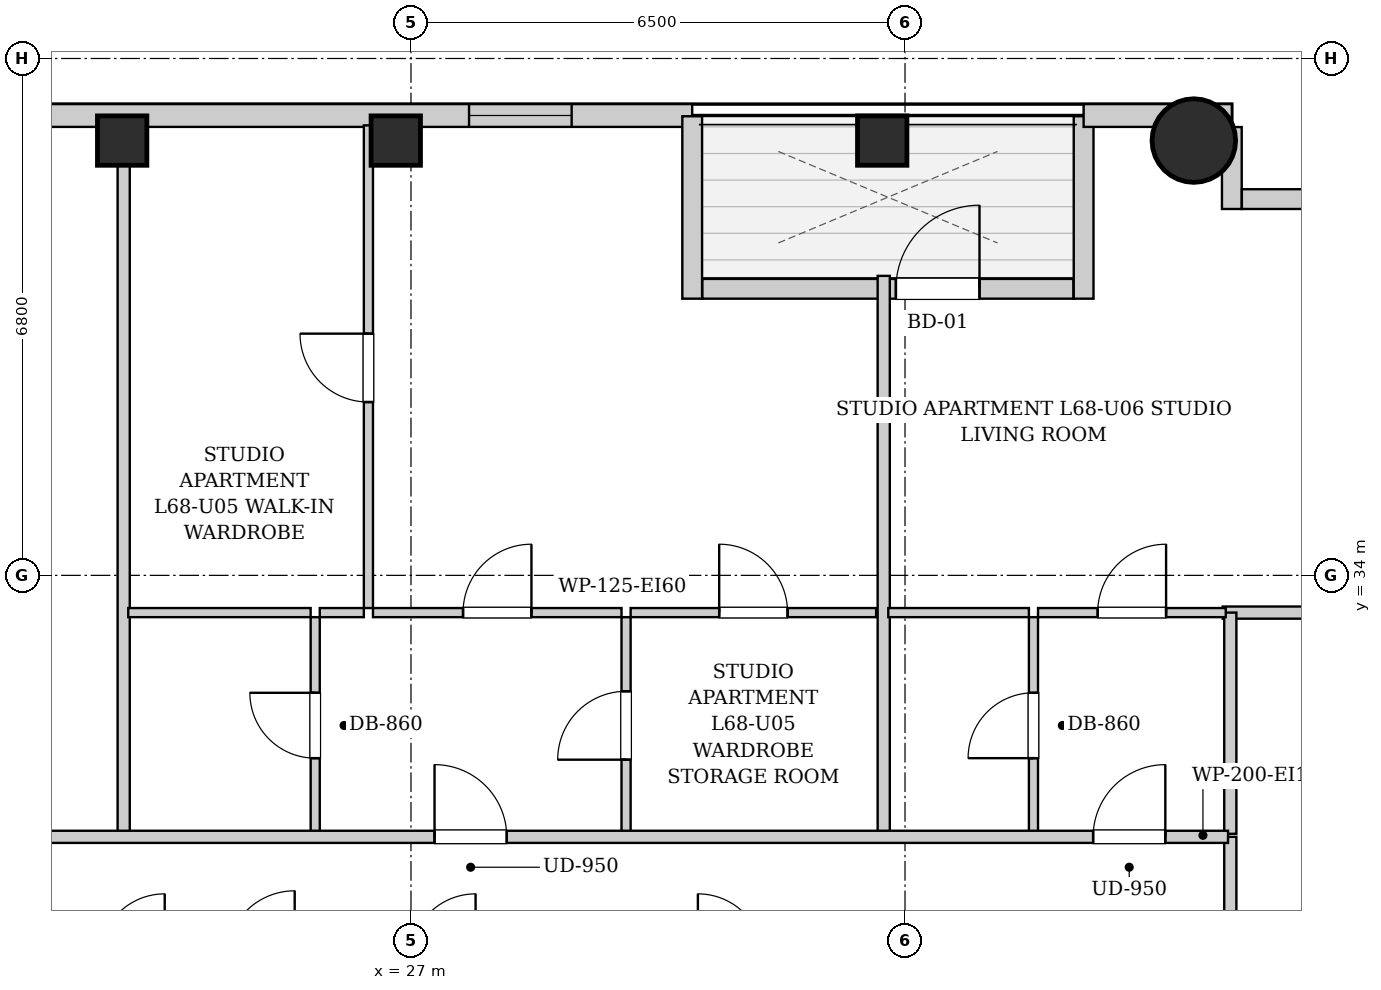
"""IFC4 building model, lengths in metres.
Left out: names, types, materials, properties, quantities, classifications, styles, units other than length and angle.
Written with IfcOpenShell. Run it as: python <this file> out.ifc"""

import sys

from ifc_helpers import new_model, si_unit, direction, frame, frame_2d, origin, origin_2d, place, context, subcontext, project, spatial, rectangle, circle, extrude, element, fill, save


model = new_model("IFC4")
c1 = context("Model", 3, precision=1e-05, world=origin(), true_north=direction((0.0, 1.0)))
c2 = subcontext(c1, "Body", "Model", "MODEL_VIEW")
j1 = project(units=[si_unit("LENGTHUNIT", "METRE"), si_unit("PLANEANGLEUNIT", "RADIAN")], contexts=[c1])
p1 = place(None, origin())
s1 = spatial("IfcSite", under=j1, at=p1, CompositionType="ELEMENT")
p2 = place(p1, origin())
s2 = spatial("IfcBuilding", under=s1, at=p2, CompositionType="ELEMENT")
p3 = place(p2, frame((0.0, 0.0, 234.3)))
s3 = spatial("IfcBuildingStorey", under=s2, at=p3, CompositionType="ELEMENT", Elevation=234.3)
for number, where, z_axis, x_axis in (
    (1, (23.2, 39.72, 0.0), (0.0, 0.0, 1.0), (1.0, 0.0, 0.0)),
    (2, (26.8, 39.72, 0.0), (0.0, 0.0, 1.0), (1.0, 0.0, 0.0)),
    (3, (33.2, 39.72, 0.0), (0.0, 0.0, 1.0), (1.0, 0.0, 0.0)),
):
    element("IfcColumn", number, at=place(p3, frame(where, z_axis=z_axis, x_axis=x_axis)), inside=s3, PredefinedType="COLUMN", context=c2, shape_type="SweptSolid", body=[
        extrude(rectangle(XDim=0.65, YDim=0.65, at=origin_2d()), origin(), (0.0, 0.0, 1.0), 3.4),
    ])
p4 = place(p3, frame((37.3, 39.72, 0.0), z_axis=(0.0, 0.0, 1.0), x_axis=(1.0, 0.0, 0.0)))
e4 = element("IfcColumn", 4, at=p4, inside=s3, PredefinedType="COLUMN", context=c2, shape_type="SweptSolid", body=[
    extrude(circle(Radius=0.55, at=origin_2d()), origin(), (0.0, 0.0, 1.0), 3.4),
])
p5 = place(p3, frame((19.7, 40.05, 0.0), z_axis=(0.0, 0.0, 1.0), x_axis=(1.0, 0.0, 0.0)))
e5 = element("IfcWall", 5, at=p5, inside=s3, PredefinedType="SOLIDWALL", context=c2, shape_type="SweptSolid", body=[
    extrude(rectangle(XDim=11.0, YDim=0.3, at=frame_2d((5.5, 0.0))), origin(), (0.0, 0.0, 1.0), 3.14),
])
p6 = place(p5, frame((8.064, 0.0, 0.55)))
e6 = element("IfcOpeningElement", 6, at=p6, cuts=e5, PredefinedType="OPENING", context=c2, shape_type="SweptSolid", body=[
    extrude(rectangle(XDim=1.35, YDim=1.2, at=frame_2d((0.675, 0.6))), frame((0.0, 0.16, 0.0), z_axis=(0.0, -1.0, 0.0), x_axis=(1.0, 0.0, 0.0)), (0.0, 0.0, 1.0), 0.32),
])
p7 = place(p3, frame((30.7, 40.04, 0.0), z_axis=(0.0, 0.0, 1.0), x_axis=(0.0, -1.0, 0.0)))
e7 = element("IfcWall", 7, at=p7, inside=s3, PredefinedType="SOLIDWALL", context=c2, shape_type="SweptSolid", body=[
    extrude(rectangle(XDim=2.4, YDim=0.26, at=frame_2d((1.2, 0.0))), origin(), (0.0, 0.0, 1.0), 3.14),
])
p8 = place(p3, frame((30.834, 37.77, 0.0), z_axis=(0.0, 0.0, 1.0), x_axis=(1.0, 0.0, 0.0)))
e8 = element("IfcWall", 8, at=p8, inside=s3, PredefinedType="SOLIDWALL", context=c2, shape_type="SweptSolid", body=[
    extrude(rectangle(XDim=4.882, YDim=0.26, at=frame_2d((2.441, 0.0))), origin(), (0.0, 0.0, 1.0), 3.14),
])
p9 = place(p8, frame((2.546, 0.0, 0.0)))
e9 = element("IfcOpeningElement", 9, at=p9, cuts=e8, PredefinedType="OPENING", context=c2, shape_type="SweptSolid", body=[
    extrude(rectangle(XDim=1.1, YDim=2.0, at=frame_2d((0.55, 1.0))), frame((0.0, 0.14, 0.0), z_axis=(0.0, -1.0, 0.0), x_axis=(1.0, 0.0, 0.0)), (0.0, 0.0, 1.0), 0.28),
])
p10 = place(p3, frame((35.85, 37.64, 0.0), z_axis=(0.0, 0.0, 1.0), x_axis=(0.0, 1.0, 0.0)))
e10 = element("IfcWall", 10, at=p10, inside=s3, PredefinedType="SOLIDWALL", context=c2, shape_type="SweptSolid", body=[
    extrude(rectangle(XDim=2.4, YDim=0.26, at=frame_2d((1.2, 0.0))), origin(), (0.0, 0.0, 1.0), 3.14),
])
p11 = place(p3, frame((35.85, 40.05, 0.0), z_axis=(0.0, 0.0, 1.0), x_axis=(1.0, 0.0, 0.0)))
e11 = element("IfcWall", 11, at=p11, inside=s3, PredefinedType="SOLIDWALL", context=c2, shape_type="SweptSolid", body=[
    extrude(rectangle(XDim=1.95, YDim=0.3, at=frame_2d((0.975, 0.0))), origin(), (0.0, 0.0, 1.0), 3.14),
])
p12 = place(p3, frame((37.8, 39.898, 0.0), z_axis=(0.0, 0.0, 1.0), x_axis=(0.0, -1.0, 0.0)))
e12 = element("IfcWall", 12, at=p12, inside=s3, PredefinedType="SOLIDWALL", context=c2, shape_type="SweptSolid", body=[
    extrude(rectangle(XDim=1.078, YDim=0.26, at=frame_2d((0.539, 0.0))), origin(), (0.0, 0.0, 1.0), 3.14),
])
p13 = place(p3, frame((37.932, 38.95, 0.0), z_axis=(0.0, 0.0, 1.0), x_axis=(1.0, 0.0, 0.0)))
e13 = element("IfcWall", 13, at=p13, inside=s3, PredefinedType="SOLIDWALL", context=c2, shape_type="SweptSolid", body=[
    extrude(rectangle(XDim=1.248, YDim=0.26, at=frame_2d((0.624, 0.0))), origin(), (0.0, 0.0, 1.0), 3.14),
])
p14 = place(p3, frame((37.78, 28.98, 0.0), z_axis=(0.0, 0.0, 1.0), x_axis=(0.0, 1.0, 0.0)))
e14 = element("IfcWall", 14, at=p14, inside=s3, PredefinedType="PARTITIONING", context=c2, shape_type="SweptSolid", body=[
    extrude(rectangle(XDim=1.58, YDim=0.16, at=frame_2d((0.79, 0.0))), origin(), (0.0, 0.0, 1.0), 3.14),
])
p15 = place(p3, frame((23.22, 30.6, 0.0), z_axis=(0.0, 0.0, 1.0), x_axis=(0.0, 1.0, 0.0)))
e15 = element("IfcWall", 15, at=p15, inside=s3, PredefinedType="PARTITIONING", context=c2, shape_type="SweptSolid", body=[
    extrude(rectangle(XDim=9.32, YDim=0.16, at=frame_2d((4.66, 0.0))), origin(), (0.0, 0.0, 1.0), 3.14),
])
p16 = place(p3, frame((25.74, 30.6, 0.0), z_axis=(0.0, 0.0, 1.0), x_axis=(0.0, 1.0, 0.0)))
e16 = element("IfcWall", 16, at=p16, inside=s3, PredefinedType="PARTITIONING", context=c2, shape_type="SweptSolid", body=[
    extrude(rectangle(XDim=2.85, YDim=0.12, at=frame_2d((1.425, 0.0))), origin(), (0.0, 0.0, 1.0), 3.14),
])
p17 = place(p16, frame((0.995, 0.0, 0.0)))
e17 = element("IfcOpeningElement", 17, at=p17, cuts=e16, PredefinedType="OPENING", context=c2, shape_type="SweptSolid", body=[
    extrude(rectangle(XDim=0.86, YDim=2.05, at=frame_2d((0.43, 1.025))), frame((0.0, 0.07, 0.0), z_axis=(0.0, -1.0, 0.0), x_axis=(1.0, 0.0, 0.0)), (0.0, 0.0, 1.0), 0.14),
])
p18 = place(p3, frame((23.28, 33.51, 0.0), z_axis=(0.0, 0.0, 1.0), x_axis=(1.0, 0.0, 0.0)))
e18 = element("IfcWall", 18, at=p18, inside=s3, PredefinedType="PARTITIONING", context=c2, shape_type="SweptSolid", body=[
    extrude(rectangle(XDim=2.4, YDim=0.12, at=frame_2d((1.2, 0.0))), origin(), (0.0, 0.0, 1.0), 3.14),
])
p19 = place(p3, frame((29.83, 30.6, 0.0), z_axis=(0.0, 0.0, 1.0), x_axis=(0.0, 1.0, 0.0)))
e19 = element("IfcWall", 19, at=p19, inside=s3, PredefinedType="PARTITIONING", context=c2, shape_type="SweptSolid", body=[
    extrude(rectangle(XDim=2.85, YDim=0.12, at=frame_2d((1.425, 0.0))), origin(), (0.0, 0.0, 1.0), 3.14),
])
p20 = place(p19, frame((0.975, 0.0, 0.0)))
e20 = element("IfcOpeningElement", 20, at=p20, cuts=e19, PredefinedType="OPENING", context=c2, shape_type="SweptSolid", body=[
    extrude(rectangle(XDim=0.9, YDim=2.05, at=frame_2d((0.45, 1.025))), frame((0.0, 0.07, 0.0), z_axis=(0.0, -1.0, 0.0), x_axis=(1.0, 0.0, 0.0)), (0.0, 0.0, 1.0), 0.14),
])
p21 = place(p3, frame((25.8, 33.51, 0.0), z_axis=(0.0, 0.0, 1.0), x_axis=(1.0, 0.0, 0.0)))
e21 = element("IfcWall", 21, at=p21, inside=s3, PredefinedType="PARTITIONING", context=c2, shape_type="SweptSolid", body=[
    extrude(rectangle(XDim=0.58, YDim=0.12, at=frame_2d((0.29, 0.0))), origin(), (0.0, 0.0, 1.0), 3.14),
])
p22 = place(p3, frame((26.5, 33.51, 0.0), z_axis=(0.0, 0.0, 1.0), x_axis=(1.0, 0.0, 0.0)))
e22 = element("IfcWall", 22, at=p22, inside=s3, PredefinedType="PARTITIONING", context=c2, shape_type="SweptSolid", body=[
    extrude(rectangle(XDim=3.27, YDim=0.12, at=frame_2d((1.635, 0.0))), origin(), (0.0, 0.0, 1.0), 3.14),
])
p23 = place(p22, frame((1.185, 0.0, 0.0)))
e23 = element("IfcOpeningElement", 23, at=p23, cuts=e22, PredefinedType="OPENING", context=c2, shape_type="SweptSolid", body=[
    extrude(rectangle(XDim=0.9, YDim=2.05, at=frame_2d((0.45, 1.025))), frame((0.0, 0.07, 0.0), z_axis=(0.0, -1.0, 0.0), x_axis=(1.0, 0.0, 0.0)), (0.0, 0.0, 1.0), 0.14),
])
p24 = place(p3, frame((29.89, 33.51, 0.0), z_axis=(0.0, 0.0, 1.0), x_axis=(1.0, 0.0, 0.0)))
e24 = element("IfcWall", 24, at=p24, inside=s3, PredefinedType="PARTITIONING", context=c2, shape_type="SweptSolid", body=[
    extrude(rectangle(XDim=3.23, YDim=0.12, at=frame_2d((1.615, 0.0))), origin(), (0.0, 0.0, 1.0), 3.14),
])
p25 = place(p24, frame((1.165, 0.0, 0.0)))
e25 = element("IfcOpeningElement", 25, at=p25, cuts=e24, PredefinedType="OPENING", context=c2, shape_type="SweptSolid", body=[
    extrude(rectangle(XDim=0.9, YDim=2.05, at=frame_2d((0.45, 1.025))), frame((0.0, 0.07, 0.0), z_axis=(0.0, -1.0, 0.0), x_axis=(1.0, 0.0, 0.0)), (0.0, 0.0, 1.0), 0.14),
])
p26 = place(p3, frame((26.44, 33.57, 0.0), z_axis=(0.0, 0.0, 1.0), x_axis=(0.0, 1.0, 0.0)))
e26 = element("IfcWall", 26, at=p26, inside=s3, PredefinedType="PARTITIONING", context=c2, shape_type="SweptSolid", body=[
    extrude(rectangle(XDim=6.35, YDim=0.12, at=frame_2d((3.175, 0.0))), origin(), (0.0, 0.0, 1.0), 3.14),
])
p27 = place(p26, frame((2.71, 0.0, 0.0)))
e27 = element("IfcOpeningElement", 27, at=p27, cuts=e26, PredefinedType="OPENING", context=c2, shape_type="SweptSolid", body=[
    extrude(rectangle(XDim=0.9, YDim=2.05, at=frame_2d((0.45, 1.025))), frame((0.0, 0.07, 0.0), z_axis=(0.0, -1.0, 0.0), x_axis=(1.0, 0.0, 0.0)), (0.0, 0.0, 1.0), 0.14),
])
p28 = place(p3, frame((37.68, 33.51, 0.0), z_axis=(0.0, 0.0, 1.0), x_axis=(1.0, 0.0, 0.0)))
e28 = element("IfcWall", 28, at=p28, inside=s3, PredefinedType="PARTITIONING", context=c2, shape_type="SweptSolid", body=[
    extrude(rectangle(XDim=2.34, YDim=0.16, at=frame_2d((1.17, 0.0))), origin(), (0.0, 0.0, 1.0), 3.14),
])
p29 = place(p3, frame((37.78, 30.6, 0.0), z_axis=(0.0, 0.0, 1.0), x_axis=(0.0, 1.0, 0.0)))
e29 = element("IfcWall", 29, at=p29, inside=s3, PredefinedType="PARTITIONING", context=c2, shape_type="SweptSolid", body=[
    extrude(rectangle(XDim=2.91, YDim=0.16, at=frame_2d((1.455, 0.0))), origin(), (0.0, 0.0, 1.0), 3.14),
])
p30 = place(p3, frame((33.22, 30.6, 0.0), z_axis=(0.0, 0.0, 1.0), x_axis=(0.0, 1.0, 0.0)))
e30 = element("IfcWall", 30, at=p30, inside=s3, PredefinedType="PARTITIONING", context=c2, shape_type="SweptSolid", body=[
    extrude(rectangle(XDim=7.34, YDim=0.16, at=frame_2d((3.67, 0.0))), origin(), (0.0, 0.0, 1.0), 2.668),
])
p31 = place(p3, frame((35.19, 30.6, 0.0), z_axis=(0.0, 0.0, 1.0), x_axis=(0.0, 1.0, 0.0)))
e31 = element("IfcWall", 31, at=p31, inside=s3, PredefinedType="PARTITIONING", context=c2, shape_type="SweptSolid", body=[
    extrude(rectangle(XDim=2.85, YDim=0.12, at=frame_2d((1.425, 0.0))), origin(), (0.0, 0.0, 1.0), 3.14),
])
p32 = place(p31, frame((0.995, 0.0, 0.0)))
e32 = element("IfcOpeningElement", 32, at=p32, cuts=e31, PredefinedType="OPENING", context=c2, shape_type="SweptSolid", body=[
    extrude(rectangle(XDim=0.86, YDim=2.05, at=frame_2d((0.43, 1.025))), frame((0.0, 0.07, 0.0), z_axis=(0.0, -1.0, 0.0), x_axis=(1.0, 0.0, 0.0)), (0.0, 0.0, 1.0), 0.14),
])
p33 = place(p3, frame((33.28, 33.51, 0.0), z_axis=(0.0, 0.0, 1.0), x_axis=(1.0, 0.0, 0.0)))
e33 = element("IfcWall", 33, at=p33, inside=s3, PredefinedType="PARTITIONING", context=c2, shape_type="SweptSolid", body=[
    extrude(rectangle(XDim=1.85, YDim=0.12, at=frame_2d((0.925, 0.0))), origin(), (0.0, 0.0, 1.0), 3.14),
])
p34 = place(p3, frame((35.25, 33.51, 0.0), z_axis=(0.0, 0.0, 1.0), x_axis=(1.0, 0.0, 0.0)))
e34 = element("IfcWall", 34, at=p34, inside=s3, PredefinedType="PARTITIONING", context=c2, shape_type="SweptSolid", body=[
    extrude(rectangle(XDim=2.47, YDim=0.12, at=frame_2d((1.235, 0.0))), origin(), (0.0, 0.0, 1.0), 3.14),
])
p35 = place(p34, frame((0.785, 0.0, 0.0)))
e35 = element("IfcOpeningElement", 35, at=p35, cuts=e34, PredefinedType="OPENING", context=c2, shape_type="SweptSolid", body=[
    extrude(rectangle(XDim=0.9, YDim=2.05, at=frame_2d((0.45, 1.025))), frame((0.0, 0.07, 0.0), z_axis=(0.0, -1.0, 0.0), x_axis=(1.0, 0.0, 0.0)), (0.0, 0.0, 1.0), 0.14),
])
p36 = place(p3, frame((13.15, 30.56, 0.0), z_axis=(0.0, 0.0, 1.0), x_axis=(1.0, 0.0, 0.0)))
e36 = element("IfcWall", 36, at=p36, inside=s3, PredefinedType="PARTITIONING", context=c2, shape_type="SweptSolid", body=[
    extrude(rectangle(XDim=24.6, YDim=0.16, at=frame_2d((12.3, 0.0))), origin(), (0.0, 0.0, 1.0), 3.14),
])
p37 = place(p36, frame((5.185, 0.0, 0.0)))
e37 = element("IfcOpeningElement", 37, at=p37, cuts=e36, PredefinedType="OPENING", context=c2, shape_type="SweptSolid", body=[
    extrude(rectangle(XDim=0.95, YDim=2.1, at=frame_2d((0.475, 1.05))), frame((0.0, 0.09, 0.0), z_axis=(0.0, -1.0, 0.0), x_axis=(1.0, 0.0, 0.0)), (0.0, 0.0, 1.0), 0.18),
])
p38 = place(p36, frame((14.16, 0.0, 0.0)))
e38 = element("IfcOpeningElement", 38, at=p38, cuts=e36, PredefinedType="OPENING", context=c2, shape_type="SweptSolid", body=[
    extrude(rectangle(XDim=0.95, YDim=2.1, at=frame_2d((0.475, 1.05))), frame((0.0, 0.09, 0.0), z_axis=(0.0, -1.0, 0.0), x_axis=(1.0, 0.0, 0.0)), (0.0, 0.0, 1.0), 0.18),
])
p39 = place(p36, frame((22.825, 0.0, 0.0)))
e39 = element("IfcOpeningElement", 39, at=p39, cuts=e36, PredefinedType="OPENING", context=c2, shape_type="SweptSolid", body=[
    extrude(rectangle(XDim=0.95, YDim=2.1, at=frame_2d((0.475, 1.05))), frame((0.0, 0.09, 0.0), z_axis=(0.0, -1.0, 0.0), x_axis=(1.0, 0.0, 0.0)), (0.0, 0.0, 1.0), 0.18),
])
p40 = place(p17, origin())
e40 = element("IfcDoor", 40, at=p40, inside=s3, OperationType="SINGLE_SWING_RIGHT", PredefinedType="DOOR", context=c2, shape_type="SweptSolid", body=[
    extrude(rectangle(XDim=0.86, YDim=2.05, at=frame_2d((0.43, 1.025))), frame((0.0, 0.025, 0.0), z_axis=(0.0, -1.0, 0.0), x_axis=(1.0, 0.0, 0.0)), (0.0, 0.0, 1.0), 0.05),
])
fill(e17, e40)
p41 = place(p20, origin())
e41 = element("IfcDoor", 41, at=p41, inside=s3, OperationType="SINGLE_SWING_LEFT", PredefinedType="DOOR", context=c2, shape_type="SweptSolid", body=[
    extrude(rectangle(XDim=0.9, YDim=2.05, at=frame_2d((0.45, 1.025))), frame((0.0, 0.025, 0.0), z_axis=(0.0, -1.0, 0.0), x_axis=(1.0, 0.0, 0.0)), (0.0, 0.0, 1.0), 0.05),
])
fill(e20, e41)
p42 = place(p23, origin())
e42 = element("IfcDoor", 42, at=p42, inside=s3, OperationType="SINGLE_SWING_RIGHT", PredefinedType="DOOR", context=c2, shape_type="SweptSolid", body=[
    extrude(rectangle(XDim=0.9, YDim=2.05, at=frame_2d((0.45, 1.025))), frame((0.0, 0.025, 0.0), z_axis=(0.0, -1.0, 0.0), x_axis=(1.0, 0.0, 0.0)), (0.0, 0.0, 1.0), 0.05),
])
fill(e23, e42)
p43 = place(p25, origin())
e43 = element("IfcDoor", 43, at=p43, inside=s3, OperationType="SINGLE_SWING_LEFT", PredefinedType="DOOR", context=c2, shape_type="SweptSolid", body=[
    extrude(rectangle(XDim=0.9, YDim=2.05, at=frame_2d((0.45, 1.025))), frame((0.0, 0.025, 0.0), z_axis=(0.0, -1.0, 0.0), x_axis=(1.0, 0.0, 0.0)), (0.0, 0.0, 1.0), 0.05),
])
fill(e25, e43)
p44 = place(p27, origin())
e44 = element("IfcDoor", 44, at=p44, inside=s3, OperationType="SINGLE_SWING_RIGHT", PredefinedType="DOOR", context=c2, shape_type="SweptSolid", body=[
    extrude(rectangle(XDim=0.9, YDim=2.05, at=frame_2d((0.45, 1.025))), frame((0.0, 0.025, 0.0), z_axis=(0.0, -1.0, 0.0), x_axis=(1.0, 0.0, 0.0)), (0.0, 0.0, 1.0), 0.05),
])
fill(e27, e44)
p45 = place(p32, origin())
e45 = element("IfcDoor", 45, at=p45, inside=s3, OperationType="SINGLE_SWING_LEFT", PredefinedType="DOOR", context=c2, shape_type="SweptSolid", body=[
    extrude(rectangle(XDim=0.86, YDim=2.05, at=frame_2d((0.43, 1.025))), frame((0.0, 0.025, 0.0), z_axis=(0.0, -1.0, 0.0), x_axis=(1.0, 0.0, 0.0)), (0.0, 0.0, 1.0), 0.05),
])
fill(e32, e45)
p46 = place(p35, origin())
e46 = element("IfcDoor", 46, at=p46, inside=s3, OperationType="SINGLE_SWING_RIGHT", PredefinedType="DOOR", context=c2, shape_type="SweptSolid", body=[
    extrude(rectangle(XDim=0.9, YDim=2.05, at=frame_2d((0.45, 1.025))), frame((0.0, 0.025, 0.0), z_axis=(0.0, -1.0, 0.0), x_axis=(1.0, 0.0, 0.0)), (0.0, 0.0, 1.0), 0.05),
])
fill(e35, e46)
p47 = place(p38, origin())
e47 = element("IfcDoor", 47, at=p47, inside=s3, OperationType="SINGLE_SWING_LEFT", PredefinedType="DOOR", context=c2, shape_type="SweptSolid", body=[
    extrude(rectangle(XDim=0.95, YDim=2.1, at=frame_2d((0.475, 1.05))), frame((0.0, 0.025, 0.0), z_axis=(0.0, -1.0, 0.0), x_axis=(1.0, 0.0, 0.0)), (0.0, 0.0, 1.0), 0.05),
])
fill(e38, e47)
p48 = place(p39, origin())
e48 = element("IfcDoor", 48, at=p48, inside=s3, OperationType="SINGLE_SWING_RIGHT", PredefinedType="DOOR", context=c2, shape_type="SweptSolid", body=[
    extrude(rectangle(XDim=0.95, YDim=2.1, at=frame_2d((0.475, 1.05))), frame((0.0, 0.025, 0.0), z_axis=(0.0, -1.0, 0.0), x_axis=(1.0, 0.0, 0.0)), (0.0, 0.0, 1.0), 0.05),
])
fill(e39, e48)
p49 = place(p9, origin())
e49 = element("IfcDoor", 49, at=p49, inside=s3, OperationType="SINGLE_SWING_RIGHT", PredefinedType="DOOR", context=c2, shape_type="SweptSolid", body=[
    extrude(rectangle(XDim=1.1, YDim=2.0, at=frame_2d((0.55, 1.0))), frame((0.0, 0.025, 0.0), z_axis=(0.0, -1.0, 0.0), x_axis=(1.0, 0.0, 0.0)), (0.0, 0.0, 1.0), 0.05),
])
fill(e9, e49)
p50 = place(p6, origin())
e50 = element("IfcWindow", 50, at=p50, inside=s3, PartitioningType="SINGLE_PANEL", PredefinedType="WINDOW", context=c2, shape_type="SweptSolid", body=[
    extrude(rectangle(XDim=1.35, YDim=1.2, at=frame_2d((0.675, 0.6))), frame((0.0, 0.03, 0.0), z_axis=(0.0, -1.0, 0.0), x_axis=(1.0, 0.0, 0.0)), (0.0, 0.0, 1.0), 0.06),
])
fill(e6, e50)
save(model, sys.argv[1])
